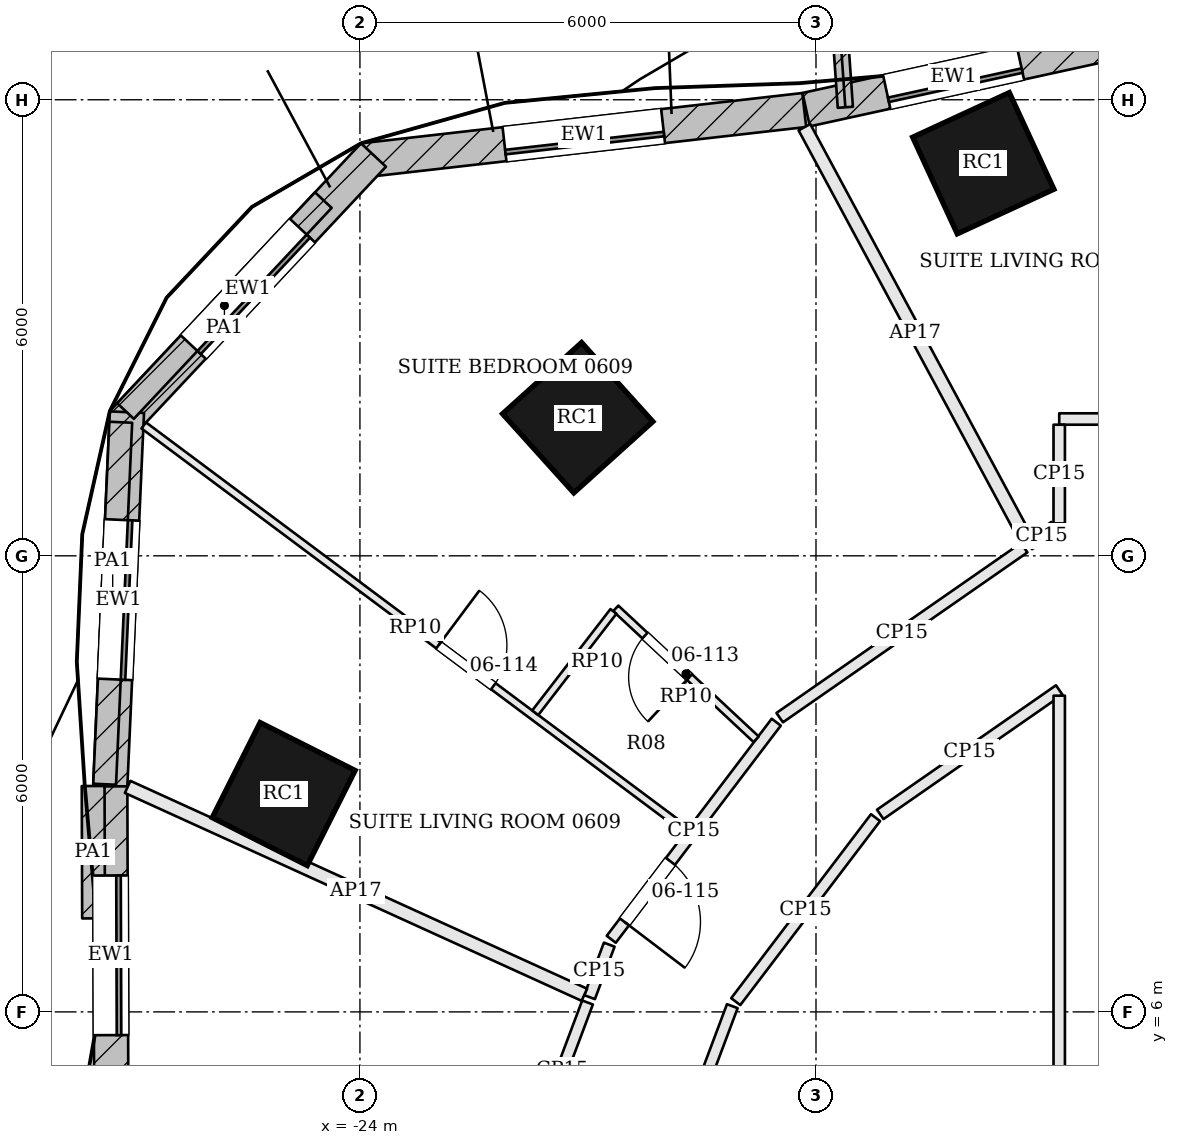
"""IFC4 building model, lengths in metres.
Left out: names, types, materials, properties, quantities, classifications, styles, units other than length and angle.
Written with IfcOpenShell. Run it as: python <this file> out.ifc"""

import sys

from ifc_helpers import new_model, si_unit, direction, frame, frame_2d, origin, origin_2d, place, context, subcontext, project, spatial, rectangle, extrude, element, fill, save


model = new_model("IFC4")
c1 = context("Model", 3, precision=1e-05, world=origin(), true_north=direction((0.0, 1.0)))
c2 = subcontext(c1, "Body", "Model", "MODEL_VIEW")
j1 = project(units=[si_unit("LENGTHUNIT", "METRE"), si_unit("PLANEANGLEUNIT", "RADIAN")], contexts=[c1])
p1 = place(None, origin())
s1 = spatial("IfcSite", under=j1, at=p1, CompositionType="ELEMENT")
p2 = place(p1, origin())
s2 = spatial("IfcBuilding", under=s1, at=p2, CompositionType="ELEMENT")
p3 = place(p2, frame((0.0, 0.0, 37.5)))
s3 = spatial("IfcBuildingStorey", under=s2, at=p3, CompositionType="ELEMENT", Elevation=37.5)
for number, where, z_axis, x_axis in (
    (1, (-15.799, 17.165, 0.0), (0.0, 0.0, 1.0), (-0.908, -0.419, 0.0)),
    (2, (-21.135, 13.817, 0.0), (0.0, 0.0, 1.0), (-0.743, -0.67, 0.0)),
    (3, (-25.003, 8.866, 0.0), (0.0, 0.0, 1.0), (-0.45, -0.893, 0.0)),
):
    element("IfcColumn", number, at=place(p3, frame(where, z_axis=z_axis, x_axis=x_axis)), inside=s3, PredefinedType="COLUMN", context=c2, shape_type="SweptSolid", body=[
        extrude(rectangle(XDim=1.4, YDim=1.4, at=origin_2d()), origin(), (0.0, 0.0, 1.0), 3.6),
    ])
p4 = place(p3, frame((-10.879, 21.473, 0.0), z_axis=(0.0, 0.0, 1.0), x_axis=(-0.77124668946, -0.636536365023, 0.0)))
e4 = element("IfcWall", 4, at=p4, inside=s3, PredefinedType="SOLIDWALL", context=c2, shape_type="SweptSolid", body=[
    extrude(rectangle(XDim=4.261, YDim=0.45, at=frame_2d((2.13, 0.0))), origin(), (0.0, 0.0, 1.0), 3.4),
])
p5 = place(p4, frame((1.08, 0.0, 0.9)))
e5 = element("IfcOpeningElement", 5, at=p5, cuts=e4, PredefinedType="OPENING", context=c2, shape_type="SweptSolid", body=[
    extrude(rectangle(XDim=2.1, YDim=2.0, at=frame_2d((1.05, 1.0))), frame((0.0, 0.235, 0.0), z_axis=(0.0, -1.0, 0.0), x_axis=(1.0, 0.0, 0.0)), (0.0, 0.0, 1.0), 0.47),
])
p6 = place(p3, frame((-14.251, 18.718, 0.0), z_axis=(0.0, 0.0, 1.0), x_axis=(-0.976903627618, -0.213680374267, 0.0)))
e6 = element("IfcWall", 6, at=p6, inside=s3, PredefinedType="SOLIDWALL", context=c2, shape_type="SweptSolid", body=[
    extrude(rectangle(XDim=3.97, YDim=0.45, at=frame_2d((1.985, 0.0))), origin(), (0.0, 0.0, 1.0), 3.4),
])
p7 = place(p6, frame((1.085, 0.0, 0.9)))
e7 = element("IfcOpeningElement", 7, at=p7, cuts=e6, PredefinedType="OPENING", context=c2, shape_type="SweptSolid", body=[
    extrude(rectangle(XDim=1.8, YDim=2.0, at=frame_2d((0.9, 1.0))), frame((0.0, 0.235, 0.0), z_axis=(0.0, -1.0, 0.0), x_axis=(1.0, 0.0, 0.0)), (0.0, 0.0, 1.0), 0.47),
])
p8 = place(p3, frame((-18.154, 17.865, 0.0), z_axis=(0.0, 0.0, 1.0), x_axis=(-0.993572909097, -0.113193967633, 0.0)))
e8 = element("IfcWall", 8, at=p8, inside=s3, PredefinedType="SOLIDWALL", context=c2, shape_type="SweptSolid", body=[
    extrude(rectangle(XDim=5.839, YDim=0.45, at=frame_2d((2.919, 0.0))), origin(), (0.0, 0.0, 1.0), 3.4),
])
p9 = place(p8, frame((1.869, 0.0, 0.9)))
e9 = element("IfcOpeningElement", 9, at=p9, cuts=e8, PredefinedType="OPENING", context=c2, shape_type="SweptSolid", body=[
    extrude(rectangle(XDim=2.1, YDim=2.0, at=frame_2d((1.05, 1.0))), frame((0.0, 0.235, 0.0), z_axis=(0.0, -1.0, 0.0), x_axis=(1.0, 0.0, 0.0)), (0.0, 0.0, 1.0), 0.47),
])
p10 = place(p3, frame((-23.822, 17.273, 0.0), z_axis=(0.0, 0.0, 1.0), x_axis=(-0.684173167988, -0.729319598122, 0.0)))
e10 = element("IfcWall", 10, at=p10, inside=s3, PredefinedType="SOLIDWALL", context=c2, shape_type="SweptSolid", body=[
    extrude(rectangle(XDim=4.829, YDim=0.45, at=frame_2d((2.415, 0.0))), origin(), (0.0, 0.0, 1.0), 3.4),
])
p11 = place(p10, frame((1.365, 0.0, 0.9)))
e11 = element("IfcOpeningElement", 11, at=p11, cuts=e10, PredefinedType="OPENING", context=c2, shape_type="SweptSolid", body=[
    extrude(rectangle(XDim=2.1, YDim=2.0, at=frame_2d((1.05, 1.0))), frame((0.0, 0.235, 0.0), z_axis=(0.0, -1.0, 0.0), x_axis=(1.0, 0.0, 0.0)), (0.0, 0.0, 1.0), 0.47),
])
p12 = place(p3, frame((-27.065, 13.89, 0.0), z_axis=(0.0, 0.0, 1.0), x_axis=(-0.044544250924, -0.99900741224, 0.0)))
e12 = element("IfcWall", 12, at=p12, inside=s3, PredefinedType="SOLIDWALL", context=c2, shape_type="SweptSolid", body=[
    extrude(rectangle(XDim=4.938, YDim=0.45, at=frame_2d((2.469, 0.0))), origin(), (0.0, 0.0, 1.0), 3.4),
])
p13 = place(p12, frame((1.419, 0.0, 0.9)))
e13 = element("IfcOpeningElement", 13, at=p13, cuts=e12, PredefinedType="OPENING", context=c2, shape_type="SweptSolid", body=[
    extrude(rectangle(XDim=2.1, YDim=2.0, at=frame_2d((1.05, 1.0))), frame((0.0, 0.235, 0.0), z_axis=(0.0, -1.0, 0.0), x_axis=(1.0, 0.0, 0.0)), (0.0, 0.0, 1.0), 0.47),
])
p14 = place(p3, frame((-27.285, 8.967, 0.0), z_axis=(0.0, 0.0, 1.0), x_axis=(0.003185571797, -0.999994926053, 0.0)))
e14 = element("IfcWall", 14, at=p14, inside=s3, PredefinedType="SOLIDWALL", context=c2, shape_type="SweptSolid", body=[
    extrude(rectangle(XDim=4.445, YDim=0.45, at=frame_2d((2.223, 0.0))), origin(), (0.0, 0.0, 1.0), 3.4),
])
p15 = place(p14, frame((1.173, 0.0, 0.9)))
e15 = element("IfcOpeningElement", 15, at=p15, cuts=e14, PredefinedType="OPENING", context=c2, shape_type="SweptSolid", body=[
    extrude(rectangle(XDim=2.1, YDim=2.0, at=frame_2d((1.05, 1.0))), frame((0.0, 0.235, 0.0), z_axis=(0.0, -1.0, 0.0), x_axis=(1.0, 0.0, 0.0)), (0.0, 0.0, 1.0), 0.47),
])
p16 = place(p3, frame((-17.614, 17.901, 0.0), z_axis=(0.0, 0.0, 1.0), x_axis=(-0.069750000204, 0.997564502913, 0.0)))
e16 = element("IfcWall", 16, at=p16, inside=s3, PredefinedType="SOLIDWALL", context=c2, shape_type="SweptSolid", body=[
    extrude(rectangle(XDim=1.75, YDim=0.2, at=frame_2d((0.875, 0.0))), origin(), (0.0, 0.0, 1.0), 3.4),
])
p17 = place(p3, frame((-24.481, 16.68, 3.6), z_axis=(0.0, 0.0, 1.0), x_axis=(-0.684154586848, -0.729337028606, 0.0)))
e17 = element("IfcWall", 17, at=p17, inside=s3, PredefinedType="PARAPET", context=c2, shape_type="SweptSolid", body=[
    extrude(rectangle(XDim=3.804, YDim=0.3, at=frame_2d((1.902, 0.0))), origin(), (0.0, 0.0, 1.0), 1.1),
])
p18 = place(p3, frame((-27.146, 13.757, 3.6), z_axis=(0.0, 0.0, 1.0), x_axis=(-0.044503972994, -0.999009207359, 0.0)))
e18 = element("IfcWall", 18, at=p18, inside=s3, PredefinedType="PARAPET", context=c2, shape_type="SweptSolid", body=[
    extrude(rectangle(XDim=4.767, YDim=0.3, at=frame_2d((2.384, 0.0))), origin(), (0.0, 0.0, 1.0), 1.1),
])
p19 = place(p3, frame((-27.51, 8.972, 3.6), z_axis=(0.0, 0.0, 1.0), x_axis=(0.003223981002, -0.99999480296, 0.0)))
e19 = element("IfcWall", 19, at=p19, inside=s3, PredefinedType="PARAPET", context=c2, shape_type="SweptSolid", body=[
    extrude(rectangle(XDim=1.742, YDim=0.3, at=frame_2d((0.871, 0.0))), origin(), (0.0, 0.0, 1.0), 1.1),
])
p20 = place(p3, frame((-11.464, 13.8, 0.0), z_axis=(0.0, 0.0, 1.0), x_axis=(-1.0, 0.0, 0.0)))
e20 = element("IfcWall", 20, at=p20, inside=s3, PredefinedType="PARTITIONING", context=c2, shape_type="SweptSolid", body=[
    extrude(rectangle(XDim=3.336, YDim=0.15, at=frame_2d((1.668, 0.0))), origin(), (0.0, 0.0, 1.0), 2.68),
])
p21 = place(p20, frame((1.8, 0.0, 0.0)))
e21 = element("IfcOpeningElement", 21, at=p21, cuts=e20, PredefinedType="OPENING", context=c2, shape_type="SweptSolid", body=[
    extrude(rectangle(XDim=1.0, YDim=2.1, at=frame_2d((0.5, 1.05))), frame((0.0, 0.085, 0.0), z_axis=(0.0, -1.0, 0.0), x_axis=(1.0, 0.0, 0.0)), (0.0, 0.0, 1.0), 0.17),
])
p22 = place(p3, frame((-14.8, 13.725, 0.0), z_axis=(0.0, 0.0, 1.0), x_axis=(-0.000188040613, -0.99999998232, 0.0)))
e22 = element("IfcWall", 22, at=p22, inside=s3, PredefinedType="PARTITIONING", context=c2, shape_type="SweptSolid", body=[
    extrude(rectangle(XDim=1.298, YDim=0.15, at=frame_2d((0.649, 0.0))), origin(), (0.0, 0.0, 1.0), 2.68),
])
p23 = place(p3, frame((-14.862, 12.384, 0.0), z_axis=(0.0, 0.0, 1.0), x_axis=(-0.821122810289, -0.57075154877, 0.0)))
e23 = element("IfcWall", 23, at=p23, inside=s3, PredefinedType="PARTITIONING", context=c2, shape_type="SweptSolid", body=[
    extrude(rectangle(XDim=0.411, YDim=0.15, at=frame_2d((0.206, 0.0))), origin(), (0.0, 0.0, 1.0), 2.68),
])
p24 = place(p3, frame((-18.152, 17.639, 0.0), z_axis=(0.0, 0.0, 1.0), x_axis=(0.473671861607, -0.880701406563, 0.0)))
e24 = element("IfcWall", 24, at=p24, inside=s3, PredefinedType="PARTITIONING", context=c2, shape_type="SweptSolid", body=[
    extrude(rectangle(XDim=6.158, YDim=0.175, at=frame_2d((3.079, 0.0))), origin(), (0.0, 0.0, 1.0), 2.68),
])
p25 = place(p3, frame((-15.261, 12.106, 0.0), z_axis=(0.0, 0.0, 1.0), x_axis=(-0.821154131814, -0.57070648481, 0.0)))
e25 = element("IfcWall", 25, at=p25, inside=s3, PredefinedType="PARTITIONING", context=c2, shape_type="SweptSolid", body=[
    extrude(rectangle(XDim=3.917, YDim=0.15, at=frame_2d((1.958, 0.0))), origin(), (0.0, 0.0, 1.0), 2.68),
])
p26 = place(p3, frame((-18.523, 9.811, 0.0), z_axis=(0.0, 0.0, 1.0), x_axis=(-0.605040130963, -0.796194976073, 0.0)))
e26 = element("IfcWall", 26, at=p26, inside=s3, PredefinedType="PARTITIONING", context=c2, shape_type="SweptSolid", body=[
    extrude(rectangle(XDim=3.588, YDim=0.15, at=frame_2d((1.794, 0.0))), origin(), (0.0, 0.0, 1.0), 2.68),
])
p27 = place(p26, frame((2.3, 0.0, 0.0)))
e27 = element("IfcOpeningElement", 27, at=p27, cuts=e26, PredefinedType="OPENING", context=c2, shape_type="SweptSolid", body=[
    extrude(rectangle(XDim=1.0, YDim=2.1, at=frame_2d((0.5, 1.05))), frame((0.0, 0.085, 0.0), z_axis=(0.0, -1.0, 0.0), x_axis=(1.0, 0.0, 0.0)), (0.0, 0.0, 1.0), 0.17),
])
p28 = place(p3, frame((-20.72, 6.885, 0.0), z_axis=(0.0, 0.0, 1.0), x_axis=(-0.3515587368, -0.936165826432, 0.0)))
e28 = element("IfcWall", 28, at=p28, inside=s3, PredefinedType="PARTITIONING", context=c2, shape_type="SweptSolid", body=[
    extrude(rectangle(XDim=0.738, YDim=0.15, at=frame_2d((0.369, 0.0))), origin(), (0.0, 0.0, 1.0), 2.68),
])
p29 = place(p3, frame((-27.056, 8.96, 0.0), z_axis=(0.0, 0.0, 1.0), x_axis=(0.91014850699, -0.414282144466, 0.0)))
e29 = element("IfcWall", 29, at=p29, inside=s3, PredefinedType="PARTITIONING", context=c2, shape_type="SweptSolid", body=[
    extrude(rectangle(XDim=6.602, YDim=0.175, at=frame_2d((3.301, 0.0))), origin(), (0.0, 0.0, 1.0), 2.68),
])
p30 = place(p3, frame((-21.006, 6.124, 0.0), z_axis=(0.0, 0.0, 1.0), x_axis=(-0.351520845222, -0.936180054997, 0.0)))
e30 = element("IfcWall", 30, at=p30, inside=s3, PredefinedType="PARTITIONING", context=c2, shape_type="SweptSolid", body=[
    extrude(rectangle(XDim=1.885, YDim=0.15, at=frame_2d((0.942, 0.0))), origin(), (0.0, 0.0, 1.0), 2.68),
])
p31 = place(p3, frame((-19.884, 3.99, 0.0), z_axis=(0.0, 0.0, 1.0), x_axis=(0.351423736928, 0.936216511884, 0.0)))
e31 = element("IfcWall", 31, at=p31, inside=s3, PredefinedType="PARTITIONING", context=c2, shape_type="SweptSolid", body=[
    extrude(rectangle(XDim=2.227, YDim=0.15, at=frame_2d((1.114, 0.0))), origin(), (0.0, 0.0, 1.0), 2.68),
])
p32 = place(p3, frame((-19.056, 6.135, 0.0), z_axis=(0.0, 0.0, 1.0), x_axis=(0.604999774258, 0.796225642107, 0.0)))
e32 = element("IfcWall", 32, at=p32, inside=s3, PredefinedType="PARTITIONING", context=c2, shape_type="SweptSolid", body=[
    extrude(rectangle(XDim=3.04, YDim=0.15, at=frame_2d((1.52, 0.0))), origin(), (0.0, 0.0, 1.0), 2.68),
])
p33 = place(p3, frame((-17.155, 8.598, 0.0), z_axis=(0.0, 0.0, 1.0), x_axis=(0.821087350938, 0.570802559673, 0.0)))
e33 = element("IfcWall", 33, at=p33, inside=s3, PredefinedType="PARTITIONING", context=c2, shape_type="SweptSolid", body=[
    extrude(rectangle(XDim=2.868, YDim=0.15, at=frame_2d((1.434, 0.0))), origin(), (0.0, 0.0, 1.0), 2.68),
])
p34 = place(p3, frame((-14.8, 10.16, 0.0), z_axis=(0.0, 0.0, 1.0), x_axis=(0.0, -1.0, 0.0)))
e34 = element("IfcWall", 34, at=p34, inside=s3, PredefinedType="PARTITIONING", context=c2, shape_type="SweptSolid", body=[
    extrude(rectangle(XDim=14.96, YDim=0.15, at=frame_2d((7.48, 0.0))), origin(), (0.0, 0.0, 1.0), 2.68),
])
p35 = place(p34, frame((6.542, 0.0, 0.0)))
e35 = element("IfcOpeningElement", 35, at=p35, cuts=e34, PredefinedType="OPENING", context=c2, shape_type="SweptSolid", body=[
    extrude(rectangle(XDim=1.8, YDim=2.1, at=frame_2d((0.9, 1.05))), frame((0.0, 0.085, 0.0), z_axis=(0.0, -1.0, 0.0), x_axis=(1.0, 0.0, 0.0)), (0.0, 0.0, 1.0), 0.17),
])
p36 = place(p3, frame((-26.844, 13.716, 0.0), z_axis=(0.0, 0.0, 1.0), x_axis=(0.801519329803, -0.59796886537, 0.0)))
e36 = element("IfcWall", 36, at=p36, inside=s3, PredefinedType="PARTITIONING", context=c2, shape_type="SweptSolid", body=[
    extrude(rectangle(XDim=8.913, YDim=0.1, at=frame_2d((4.457, 0.0))), origin(), (0.0, 0.0, 1.0), 2.884),
])
p37 = place(p36, frame((4.838, 0.0, 0.0)))
e37 = element("IfcOpeningElement", 37, at=p37, cuts=e36, PredefinedType="OPENING", context=c2, shape_type="SweptSolid", body=[
    extrude(rectangle(XDim=0.9, YDim=2.4, at=frame_2d((0.45, 1.2))), frame((0.0, 0.06, 0.0), z_axis=(0.0, -1.0, 0.0), x_axis=(1.0, 0.0, 0.0)), (0.0, 0.0, 1.0), 0.12),
])
p38 = place(p3, frame((-18.787, 9.587, 0.0), z_axis=(0.0, 0.0, 1.0), x_axis=(-0.731473133424, 0.681870262645, 0.0)))
e38 = element("IfcWall", 38, at=p38, inside=s3, PredefinedType="PARTITIONING", context=c2, shape_type="SweptSolid", body=[
    extrude(rectangle(XDim=2.525, YDim=0.1, at=frame_2d((1.262, 0.0))), origin(), (0.0, 0.0, 1.0), 2.884),
])
p39 = place(p38, frame((1.2, 0.0, 0.0)))
e39 = element("IfcOpeningElement", 39, at=p39, cuts=e38, PredefinedType="OPENING", context=c2, shape_type="SweptSolid", body=[
    extrude(rectangle(XDim=0.8, YDim=2.1, at=frame_2d((0.4, 1.05))), frame((0.0, 0.06, 0.0), z_axis=(0.0, -1.0, 0.0), x_axis=(1.0, 0.0, 0.0)), (0.0, 0.0, 1.0), 0.12),
])
p40 = place(p3, frame((-20.665, 11.269, 0.0), z_axis=(0.0, 0.0, 1.0), x_axis=(-0.610915108386, -0.791696109847, 0.0)))
e40 = element("IfcWall", 40, at=p40, inside=s3, PredefinedType="PARTITIONING", context=c2, shape_type="SweptSolid", body=[
    extrude(rectangle(XDim=1.684, YDim=0.1, at=frame_2d((0.842, 0.0))), origin(), (0.0, 0.0, 1.0), 2.884),
])
p41 = place(p7, origin())
e41 = element("IfcWindow", 41, at=p41, inside=s3, PartitioningType="SINGLE_PANEL", PredefinedType="WINDOW", context=c2, shape_type="SweptSolid", body=[
    extrude(rectangle(XDim=1.8, YDim=2.0, at=frame_2d((0.9, 1.0))), frame((0.0, 0.135, 0.0), z_axis=(0.0, -1.0, 0.0), x_axis=(1.0, 0.0, 0.0)), (0.0, 0.0, 1.0), 0.06),
])
fill(e7, e41)
p42 = place(p9, origin())
e42 = element("IfcWindow", 42, at=p42, inside=s3, PartitioningType="SINGLE_PANEL", PredefinedType="WINDOW", context=c2, shape_type="SweptSolid", body=[
    extrude(rectangle(XDim=2.1, YDim=2.0, at=frame_2d((1.05, 1.0))), frame((0.0, 0.135, 0.0), z_axis=(0.0, -1.0, 0.0), x_axis=(1.0, 0.0, 0.0)), (0.0, 0.0, 1.0), 0.06),
])
fill(e9, e42)
p43 = place(p11, origin())
e43 = element("IfcWindow", 43, at=p43, inside=s3, PartitioningType="SINGLE_PANEL", PredefinedType="WINDOW", context=c2, shape_type="SweptSolid", body=[
    extrude(rectangle(XDim=2.1, YDim=2.0, at=frame_2d((1.05, 1.0))), frame((0.0, 0.135, 0.0), z_axis=(0.0, -1.0, 0.0), x_axis=(1.0, 0.0, 0.0)), (0.0, 0.0, 1.0), 0.06),
])
fill(e11, e43)
p44 = place(p13, origin())
e44 = element("IfcWindow", 44, at=p44, inside=s3, PartitioningType="SINGLE_PANEL", PredefinedType="WINDOW", context=c2, shape_type="SweptSolid", body=[
    extrude(rectangle(XDim=2.1, YDim=2.0, at=frame_2d((1.05, 1.0))), frame((0.0, 0.135, 0.0), z_axis=(0.0, -1.0, 0.0), x_axis=(1.0, 0.0, 0.0)), (0.0, 0.0, 1.0), 0.06),
])
fill(e13, e44)
p45 = place(p15, origin())
e45 = element("IfcWindow", 45, at=p45, inside=s3, PartitioningType="SINGLE_PANEL", PredefinedType="WINDOW", context=c2, shape_type="SweptSolid", body=[
    extrude(rectangle(XDim=2.1, YDim=2.0, at=frame_2d((1.05, 1.0))), frame((0.0, 0.135, 0.0), z_axis=(0.0, -1.0, 0.0), x_axis=(1.0, 0.0, 0.0)), (0.0, 0.0, 1.0), 0.06),
])
fill(e15, e45)
p46 = place(p39, origin())
e46 = element("IfcDoor", 46, at=p46, inside=s3, OperationType="SINGLE_SWING_LEFT", PredefinedType="DOOR", context=c2, shape_type="SweptSolid", body=[
    extrude(rectangle(XDim=0.8, YDim=2.1, at=frame_2d((0.4, 1.05))), frame((0.0, 0.025, 0.0), z_axis=(0.0, -1.0, 0.0), x_axis=(1.0, 0.0, 0.0)), (0.0, 0.0, 1.0), 0.05),
])
fill(e39, e46)
p47 = place(p37, origin())
e47 = element("IfcDoor", 47, at=p47, inside=s3, OperationType="SINGLE_SWING_LEFT", PredefinedType="DOOR", context=c2, shape_type="SweptSolid", body=[
    extrude(rectangle(XDim=0.9, YDim=2.4, at=frame_2d((0.45, 1.2))), frame((0.0, 0.025, 0.0), z_axis=(0.0, -1.0, 0.0), x_axis=(1.0, 0.0, 0.0)), (0.0, 0.0, 1.0), 0.05),
])
fill(e37, e47)
p48 = place(p27, origin())
e48 = element("IfcDoor", 48, at=p48, inside=s3, OperationType="SINGLE_SWING_RIGHT", PredefinedType="DOOR", context=c2, shape_type="SweptSolid", body=[
    extrude(rectangle(XDim=1.0, YDim=2.1, at=frame_2d((0.5, 1.05))), frame((0.0, 0.025, 0.0), z_axis=(0.0, -1.0, 0.0), x_axis=(1.0, 0.0, 0.0)), (0.0, 0.0, 1.0), 0.05),
])
fill(e27, e48)
save(model, sys.argv[1])
